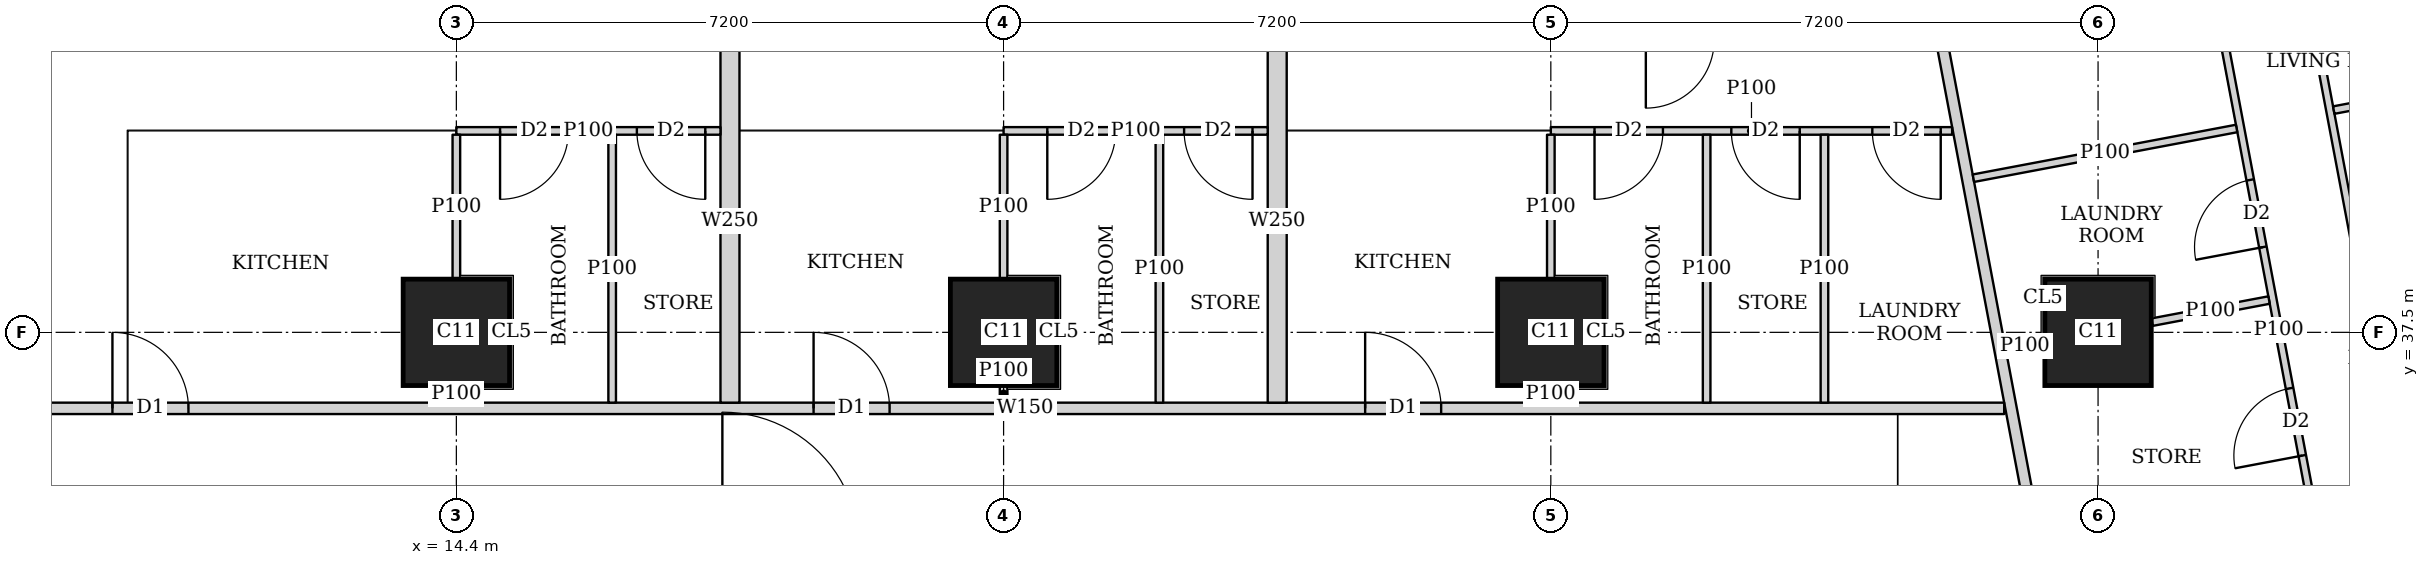
"""IFC4 building model, lengths in metres.
Left out: names, types, materials, properties, quantities, classifications, styles, units other than length and angle.
Written with IfcOpenShell. Run it as: python <this file> out.ifc"""

import sys

from ifc_helpers import new_model, si_unit, direction, frame, frame_2d, origin, origin_2d, place, context, subcontext, project, spatial, rectangle, extrude, element, fill, save


model = new_model("IFC4")
c1 = context("Model", 3, precision=1e-05, world=origin(), true_north=direction((0.0, 1.0)))
c2 = subcontext(c1, "Body", "Model", "MODEL_VIEW")
j1 = project(units=[si_unit("LENGTHUNIT", "METRE"), si_unit("PLANEANGLEUNIT", "RADIAN")], contexts=[c1])
p1 = place(None, origin())
s1 = spatial("IfcSite", under=j1, at=p1, CompositionType="ELEMENT")
p2 = place(p1, origin())
s2 = spatial("IfcBuilding", under=s1, at=p2, CompositionType="ELEMENT")
p3 = place(p2, frame((0.0, 0.0, 208.7)))
s3 = spatial("IfcBuildingStorey", under=s2, at=p3, CompositionType="ELEMENT", Elevation=208.7)
for number, where, z_axis, x_axis in (
    (1, (14.4, 37.5, 0.0), (0.0, 0.0, 1.0), (1.0, 0.0, 0.0)),
    (2, (21.6, 37.5, 0.0), (0.0, 0.0, 1.0), (1.0, 0.0, 0.0)),
    (3, (28.8, 37.5, 0.0), (0.0, 0.0, 1.0), (1.0, 0.0, 0.0)),
    (4, (36.0, 37.5, 0.0), (0.0, 0.0, 1.0), (1.0, 0.0, 0.0)),
):
    element("IfcColumn", number, at=place(p3, frame(where, z_axis=z_axis, x_axis=x_axis)), inside=s3, PredefinedType="COLUMN", context=c2, shape_type="SweptSolid", body=[
        extrude(rectangle(XDim=1.4, YDim=1.4, at=origin_2d()), origin(), (0.0, 0.0, 1.0), 3.75),
    ])
p4 = place(p3, frame((9.001, 36.5, 0.0), z_axis=(0.0, 0.0, 1.0), x_axis=(1.0, 0.0, 0.0)))
e5 = element("IfcWall", 5, at=p4, inside=s3, PredefinedType="SOLIDWALL", context=c2, shape_type="SweptSolid", body=[
    extrude(rectangle(XDim=25.764, YDim=0.15, at=frame_2d((12.882, 0.0))), origin(), (0.0, 0.0, 1.0), 3.5),
])
p5 = place(p4, frame((0.874, 0.0, 0.0)))
e6 = element("IfcOpeningElement", 6, at=p5, cuts=e5, PredefinedType="OPENING", context=c2, shape_type="SweptSolid", body=[
    extrude(rectangle(XDim=1.0, YDim=2.1, at=frame_2d((0.5, 1.05))), frame((0.0, 0.085, 0.0), z_axis=(0.0, -1.0, 0.0), x_axis=(1.0, 0.0, 0.0)), (0.0, 0.0, 1.0), 0.17),
])
p6 = place(p4, frame((10.099, 0.0, 0.0)))
e7 = element("IfcOpeningElement", 7, at=p6, cuts=e5, PredefinedType="OPENING", context=c2, shape_type="SweptSolid", body=[
    extrude(rectangle(XDim=1.0, YDim=2.1, at=frame_2d((0.5, 1.05))), frame((0.0, 0.085, 0.0), z_axis=(0.0, -1.0, 0.0), x_axis=(1.0, 0.0, 0.0)), (0.0, 0.0, 1.0), 0.17),
])
p7 = place(p4, frame((17.356, 0.0, 0.0)))
e8 = element("IfcOpeningElement", 8, at=p7, cuts=e5, PredefinedType="OPENING", context=c2, shape_type="SweptSolid", body=[
    extrude(rectangle(XDim=1.0, YDim=2.1, at=frame_2d((0.5, 1.05))), frame((0.0, 0.085, 0.0), z_axis=(0.0, -1.0, 0.0), x_axis=(1.0, 0.0, 0.0)), (0.0, 0.0, 1.0), 0.17),
])
p8 = place(p3, frame((33.68, 42.723, 0.0), z_axis=(0.0, 0.0, 1.0), x_axis=(0.185601160014, -0.982625162207, 0.0)))
e9 = element("IfcWall", 9, at=p8, inside=s3, PredefinedType="SOLIDWALL", context=c2, shape_type="SweptSolid", body=[
    extrude(rectangle(XDim=41.051, YDim=0.15, at=frame_2d((20.526, 0.0))), origin(), (0.0, 0.0, 1.0), 2.5),
])
p9 = place(p8, frame((12.307, 0.0, 0.0)))
e10 = element("IfcOpeningElement", 10, at=p9, cuts=e9, PredefinedType="OPENING", context=c2, shape_type="SweptSolid", body=[
    extrude(rectangle(XDim=1.0, YDim=2.1, at=frame_2d((0.5, 1.05))), frame((0.0, 0.085, 0.0), z_axis=(0.0, -1.0, 0.0), x_axis=(1.0, 0.0, 0.0)), (0.0, 0.0, 1.0), 0.17),
])
p10 = place(p8, frame((16.123, 0.0, 0.0)))
e11 = element("IfcOpeningElement", 11, at=p10, cuts=e9, PredefinedType="OPENING", context=c2, shape_type="SweptSolid", body=[
    extrude(rectangle(XDim=1.0, YDim=2.1, at=frame_2d((0.5, 1.05))), frame((0.0, 0.085, 0.0), z_axis=(0.0, -1.0, 0.0), x_axis=(1.0, 0.0, 0.0)), (0.0, 0.0, 1.0), 0.17),
])
p11 = place(p8, frame((30.902, 0.0, 0.0)))
e12 = element("IfcOpeningElement", 12, at=p11, cuts=e9, PredefinedType="OPENING", context=c2, shape_type="SweptSolid", body=[
    extrude(rectangle(XDim=1.0, YDim=2.1, at=frame_2d((0.5, 1.05))), frame((0.0, 0.085, 0.0), z_axis=(0.0, -1.0, 0.0), x_axis=(1.0, 0.0, 0.0)), (0.0, 0.0, 1.0), 0.17),
])
p12 = place(p3, frame((38.764, 41.941, 0.0), z_axis=(0.0, 0.0, 1.0), x_axis=(0.185548572312, -0.982635093671, 0.0)))
e13 = element("IfcWall", 13, at=p12, inside=s3, PredefinedType="PARTITIONING", context=c2, shape_type="SweptSolid", body=[
    extrude(rectangle(XDim=9.135, YDim=0.1, at=frame_2d((4.568, 0.0))), origin(), (0.0, 0.0, 1.0), 3.5),
])
p13 = place(p12, frame((8.085, 0.0, 0.0)))
e14 = element("IfcOpeningElement", 14, at=p13, cuts=e13, PredefinedType="OPENING", context=c2, shape_type="SweptSolid", body=[
    extrude(rectangle(XDim=0.9, YDim=2.1, at=frame_2d((0.45, 1.05))), frame((0.0, 0.06, 0.0), z_axis=(0.0, -1.0, 0.0), x_axis=(1.0, 0.0, 0.0)), (0.0, 0.0, 1.0), 0.12),
])
p14 = place(p12, frame((3.7, 0.0, 0.0)))
e15 = element("IfcOpeningElement", 15, at=p14, cuts=e13, PredefinedType="OPENING", context=c2, shape_type="SweptSolid", body=[
    extrude(rectangle(XDim=0.9, YDim=2.1, at=frame_2d((0.45, 1.05))), frame((0.0, 0.06, 0.0), z_axis=(0.0, -1.0, 0.0), x_axis=(1.0, 0.0, 0.0)), (0.0, 0.0, 1.0), 0.12),
])
p15 = place(p3, frame((37.473, 42.309, 0.0), z_axis=(0.0, 0.0, 1.0), x_axis=(0.185491912953, -0.982645790827, 0.0)))
e16 = element("IfcWall", 16, at=p15, inside=s3, PredefinedType="PARTITIONING", context=c2, shape_type="SweptSolid", body=[
    extrude(rectangle(XDim=9.737, YDim=0.1, at=frame_2d((4.869, 0.0))), origin(), (0.0, 0.0, 1.0), 3.5),
])
p16 = place(p15, frame((8.312, 0.0, 0.0)))
e17 = element("IfcOpeningElement", 17, at=p16, cuts=e16, PredefinedType="OPENING", context=c2, shape_type="SweptSolid", body=[
    extrude(rectangle(XDim=0.9, YDim=2.1, at=frame_2d((0.45, 1.05))), frame((0.0, 0.06, 0.0), z_axis=(0.0, -1.0, 0.0), x_axis=(1.0, 0.0, 0.0)), (0.0, 0.0, 1.0), 0.12),
])
p17 = place(p15, frame((2.853, 0.0, 0.0)))
e18 = element("IfcOpeningElement", 18, at=p17, cuts=e16, PredefinedType="OPENING", context=c2, shape_type="SweptSolid", body=[
    extrude(rectangle(XDim=0.9, YDim=2.1, at=frame_2d((0.45, 1.05))), frame((0.0, 0.06, 0.0), z_axis=(0.0, -1.0, 0.0), x_axis=(1.0, 0.0, 0.0)), (0.0, 0.0, 1.0), 0.12),
])
p18 = place(p15, frame((5.644, 0.0, 0.0)))
e19 = element("IfcOpeningElement", 19, at=p18, cuts=e16, PredefinedType="OPENING", context=c2, shape_type="SweptSolid", body=[
    extrude(rectangle(XDim=0.9, YDim=2.1, at=frame_2d((0.45, 1.05))), frame((0.0, 0.06, 0.0), z_axis=(0.0, -1.0, 0.0), x_axis=(1.0, 0.0, 0.0)), (0.0, 0.0, 1.0), 0.12),
])
p19 = place(p3, frame((43.277, 41.212, 0.0), z_axis=(0.0, 0.0, 1.0), x_axis=(-0.982665405803, -0.185387972203, 0.0)))
e20 = element("IfcWall", 20, at=p19, inside=s3, PredefinedType="PARTITIONING", context=c2, shape_type="SweptSolid", body=[
    extrude(rectangle(XDim=4.25, YDim=0.1, at=frame_2d((2.125, 0.0))), origin(), (0.0, 0.0, 1.0), 2.05),
])
p20 = place(p3, frame((37.823, 40.182, 0.0), z_axis=(0.0, 0.0, 1.0), x_axis=(-0.98263926043, -0.185526504472, 0.0)))
e21 = element("IfcWall", 21, at=p20, inside=s3, PredefinedType="PARTITIONING", context=c2, shape_type="SweptSolid", body=[
    extrude(rectangle(XDim=3.524, YDim=0.1, at=frame_2d((1.762, 0.0))), origin(), (0.0, 0.0, 1.0), 3.5),
])
p21 = place(p3, frame((38.25, 37.925, 0.0), z_axis=(0.0, 0.0, 1.0), x_axis=(-0.982610209589, -0.185680305934, 0.0)))
e22 = element("IfcWall", 22, at=p21, inside=s3, PredefinedType="PARTITIONING", context=c2, shape_type="SweptSolid", body=[
    extrude(rectangle(XDim=1.567, YDim=0.1, at=frame_2d((0.784, 0.0))), origin(), (0.0, 0.0, 1.0), 3.5),
])
p22 = place(p3, frame((35.29, 37.366, 0.0), z_axis=(0.0, 0.0, 1.0), x_axis=(-0.982715597703, -0.185121727606, 0.0)))
e23 = element("IfcWall", 23, at=p22, inside=s3, PredefinedType="PARTITIONING", context=c2, shape_type="SweptSolid", body=[
    extrude(rectangle(XDim=0.513, YDim=0.1, at=frame_2d((0.256, 0.0))), origin(), (0.0, 0.0, 1.0), 3.5),
])
p23 = place(p3, frame((14.4, 40.15, 0.0), z_axis=(0.0, 0.0, 1.0), x_axis=(1.0, 0.0, 0.0)))
e24 = element("IfcWall", 24, at=p23, inside=s3, PredefinedType="PARTITIONING", context=c2, shape_type="SweptSolid", body=[
    extrude(rectangle(XDim=3.475, YDim=0.1, at=frame_2d((1.738, 0.0))), origin(), (0.0, 0.0, 1.0), 3.5),
])
p24 = place(p23, frame((0.575, 0.0, 0.0)))
e25 = element("IfcOpeningElement", 25, at=p24, cuts=e24, PredefinedType="OPENING", context=c2, shape_type="SweptSolid", body=[
    extrude(rectangle(XDim=0.9, YDim=2.1, at=frame_2d((0.45, 1.05))), frame((0.0, 0.06, 0.0), z_axis=(0.0, -1.0, 0.0), x_axis=(1.0, 0.0, 0.0)), (0.0, 0.0, 1.0), 0.12),
])
p25 = place(p23, frame((2.375, 0.0, 0.0)))
e26 = element("IfcOpeningElement", 26, at=p25, cuts=e24, PredefinedType="OPENING", context=c2, shape_type="SweptSolid", body=[
    extrude(rectangle(XDim=0.9, YDim=2.1, at=frame_2d((0.45, 1.05))), frame((0.0, 0.06, 0.0), z_axis=(0.0, -1.0, 0.0), x_axis=(1.0, 0.0, 0.0)), (0.0, 0.0, 1.0), 0.12),
])
p26 = place(p3, frame((14.4, 36.575, 0.0), z_axis=(0.0, 0.0, 1.0), x_axis=(0.0, 1.0, 0.0)))
e27 = element("IfcWall", 27, at=p26, inside=s3, PredefinedType="PARTITIONING", context=c2, shape_type="SweptSolid", body=[
    extrude(rectangle(XDim=0.224, YDim=0.1, at=frame_2d((0.112, 0.0))), origin(), (0.0, 0.0, 1.0), 3.5),
])
p27 = place(p3, frame((14.4, 38.201, 0.0), z_axis=(0.0, 0.0, 1.0), x_axis=(0.0, 1.0, 0.0)))
e28 = element("IfcWall", 28, at=p27, inside=s3, PredefinedType="PARTITIONING", context=c2, shape_type="SweptSolid", body=[
    extrude(rectangle(XDim=1.899, YDim=0.1, at=frame_2d((0.95, 0.0))), origin(), (0.0, 0.0, 1.0), 3.5),
])
p28 = place(p3, frame((16.45, 36.575, 0.0), z_axis=(0.0, 0.0, 1.0), x_axis=(0.0, 1.0, 0.0)))
e29 = element("IfcWall", 29, at=p28, inside=s3, PredefinedType="PARTITIONING", context=c2, shape_type="SweptSolid", body=[
    extrude(rectangle(XDim=3.525, YDim=0.1, at=frame_2d((1.763, 0.0))), origin(), (0.0, 0.0, 1.0), 3.5),
])
p29 = place(p3, frame((21.6, 40.15, 0.0), z_axis=(0.0, 0.0, 1.0), x_axis=(1.0, 0.0, 0.0)))
e30 = element("IfcWall", 30, at=p29, inside=s3, PredefinedType="PARTITIONING", context=c2, shape_type="SweptSolid", body=[
    extrude(rectangle(XDim=3.475, YDim=0.1, at=frame_2d((1.737, 0.0))), origin(), (0.0, 0.0, 1.0), 3.5),
])
p30 = place(p29, frame((0.575, 0.0, 0.0)))
e31 = element("IfcOpeningElement", 31, at=p30, cuts=e30, PredefinedType="OPENING", context=c2, shape_type="SweptSolid", body=[
    extrude(rectangle(XDim=0.9, YDim=2.1, at=frame_2d((0.45, 1.05))), frame((0.0, 0.06, 0.0), z_axis=(0.0, -1.0, 0.0), x_axis=(1.0, 0.0, 0.0)), (0.0, 0.0, 1.0), 0.12),
])
p31 = place(p29, frame((2.375, 0.0, 0.0)))
e32 = element("IfcOpeningElement", 32, at=p31, cuts=e30, PredefinedType="OPENING", context=c2, shape_type="SweptSolid", body=[
    extrude(rectangle(XDim=0.9, YDim=2.1, at=frame_2d((0.45, 1.05))), frame((0.0, 0.06, 0.0), z_axis=(0.0, -1.0, 0.0), x_axis=(1.0, 0.0, 0.0)), (0.0, 0.0, 1.0), 0.12),
])
p32 = place(p3, frame((21.6, 36.575, 0.0), z_axis=(0.0, 0.0, 1.0), x_axis=(0.0, 1.0, 0.0)))
e33 = element("IfcWall", 33, at=p32, inside=s3, PredefinedType="PARTITIONING", context=c2, shape_type="SweptSolid", body=[
    extrude(rectangle(XDim=0.224, YDim=0.1, at=frame_2d((0.112, 0.0))), origin(), (0.0, 0.0, 1.0), 3.5),
])
p33 = place(p3, frame((21.6, 38.201, 0.0), z_axis=(0.0, 0.0, 1.0), x_axis=(0.0, 1.0, 0.0)))
e34 = element("IfcWall", 34, at=p33, inside=s3, PredefinedType="PARTITIONING", context=c2, shape_type="SweptSolid", body=[
    extrude(rectangle(XDim=1.899, YDim=0.1, at=frame_2d((0.95, 0.0))), origin(), (0.0, 0.0, 1.0), 3.5),
])
p34 = place(p3, frame((23.65, 36.575, 0.0), z_axis=(0.0, 0.0, 1.0), x_axis=(0.0, 1.0, 0.0)))
e35 = element("IfcWall", 35, at=p34, inside=s3, PredefinedType="PARTITIONING", context=c2, shape_type="SweptSolid", body=[
    extrude(rectangle(XDim=3.525, YDim=0.1, at=frame_2d((1.763, 0.0))), origin(), (0.0, 0.0, 1.0), 3.5),
])
p35 = place(p3, frame((18.0, 36.575, 0.0), z_axis=(0.0, 0.0, 1.0), x_axis=(0.0, 1.0, 0.0)))
e36 = element("IfcWall", 36, at=p35, inside=s3, PredefinedType="SOLIDWALL", context=c2, shape_type="SweptSolid", body=[
    extrude(rectangle(XDim=4.775, YDim=0.25, at=frame_2d((2.388, 0.0))), origin(), (0.0, 0.0, 1.0), 3.5),
])
p36 = place(p3, frame((28.8, 40.15, 0.0), z_axis=(0.0, 0.0, 1.0), x_axis=(1.0, 0.0, 0.0)))
e37 = element("IfcWall", 37, at=p36, inside=s3, PredefinedType="PARTITIONING", context=c2, shape_type="SweptSolid", body=[
    extrude(rectangle(XDim=5.28, YDim=0.1, at=frame_2d((2.64, 0.0))), origin(), (0.0, 0.0, 1.0), 3.5),
])
p37 = place(p36, frame((0.575, 0.0, 0.0)))
e38 = element("IfcOpeningElement", 38, at=p37, cuts=e37, PredefinedType="OPENING", context=c2, shape_type="SweptSolid", body=[
    extrude(rectangle(XDim=0.9, YDim=2.1, at=frame_2d((0.45, 1.05))), frame((0.0, 0.06, 0.0), z_axis=(0.0, -1.0, 0.0), x_axis=(1.0, 0.0, 0.0)), (0.0, 0.0, 1.0), 0.12),
])
p38 = place(p36, frame((4.23, 0.0, 0.0)))
e39 = element("IfcOpeningElement", 39, at=p38, cuts=e37, PredefinedType="OPENING", context=c2, shape_type="SweptSolid", body=[
    extrude(rectangle(XDim=0.9, YDim=2.1, at=frame_2d((0.45, 1.05))), frame((0.0, 0.06, 0.0), z_axis=(0.0, -1.0, 0.0), x_axis=(1.0, 0.0, 0.0)), (0.0, 0.0, 1.0), 0.12),
])
p39 = place(p36, frame((2.375, 0.0, 0.0)))
e40 = element("IfcOpeningElement", 40, at=p39, cuts=e37, PredefinedType="OPENING", context=c2, shape_type="SweptSolid", body=[
    extrude(rectangle(XDim=0.9, YDim=2.1, at=frame_2d((0.45, 1.05))), frame((0.0, 0.06, 0.0), z_axis=(0.0, -1.0, 0.0), x_axis=(1.0, 0.0, 0.0)), (0.0, 0.0, 1.0), 0.12),
])
p40 = place(p3, frame((28.8, 36.575, 0.0), z_axis=(0.0, 0.0, 1.0), x_axis=(0.0, 1.0, 0.0)))
e41 = element("IfcWall", 41, at=p40, inside=s3, PredefinedType="PARTITIONING", context=c2, shape_type="SweptSolid", body=[
    extrude(rectangle(XDim=0.224, YDim=0.1, at=frame_2d((0.112, 0.0))), origin(), (0.0, 0.0, 1.0), 3.5),
])
p41 = place(p3, frame((28.8, 38.201, 0.0), z_axis=(0.0, 0.0, 1.0), x_axis=(0.0, 1.0, 0.0)))
e42 = element("IfcWall", 42, at=p41, inside=s3, PredefinedType="PARTITIONING", context=c2, shape_type="SweptSolid", body=[
    extrude(rectangle(XDim=1.899, YDim=0.1, at=frame_2d((0.95, 0.0))), origin(), (0.0, 0.0, 1.0), 3.5),
])
for number, where, z_axis, x_axis in (
    (43, (32.4, 36.575, 0.0), (0.0, 0.0, 1.0), (0.0, 1.0, 0.0)),
    (44, (30.85, 36.575, 0.0), (0.0, 0.0, 1.0), (0.0, 1.0, 0.0)),
):
    element("IfcWall", number, at=place(p3, frame(where, z_axis=z_axis, x_axis=x_axis)), inside=s3, PredefinedType="PARTITIONING", context=c2, shape_type="SweptSolid", body=[
        extrude(rectangle(XDim=3.525, YDim=0.1, at=frame_2d((1.763, 0.0))), origin(), (0.0, 0.0, 1.0), 3.5),
    ])
p42 = place(p3, frame((25.2, 36.575, 0.0), z_axis=(0.0, 0.0, 1.0), x_axis=(0.0, 1.0, 0.0)))
e45 = element("IfcWall", 45, at=p42, inside=s3, PredefinedType="SOLIDWALL", context=c2, shape_type="SweptSolid", body=[
    extrude(rectangle(XDim=4.775, YDim=0.25, at=frame_2d((2.388, 0.0))), origin(), (0.0, 0.0, 1.0), 3.5),
])
p43 = place(p17, origin())
e46 = element("IfcDoor", 46, at=p43, inside=s3, OperationType="SINGLE_SWING_LEFT", PredefinedType="DOOR", context=c2, shape_type="SweptSolid", body=[
    extrude(rectangle(XDim=0.9, YDim=2.1, at=frame_2d((0.45, 1.05))), frame((0.0, 0.025, 0.0), z_axis=(0.0, -1.0, 0.0), x_axis=(1.0, 0.0, 0.0)), (0.0, 0.0, 1.0), 0.05),
])
fill(e18, e46)
p44 = place(p18, origin())
e47 = element("IfcDoor", 47, at=p44, inside=s3, OperationType="SINGLE_SWING_LEFT", PredefinedType="DOOR", context=c2, shape_type="SweptSolid", body=[
    extrude(rectangle(XDim=0.9, YDim=2.1, at=frame_2d((0.45, 1.05))), frame((0.0, 0.025, 0.0), z_axis=(0.0, -1.0, 0.0), x_axis=(1.0, 0.0, 0.0)), (0.0, 0.0, 1.0), 0.05),
])
fill(e19, e47)
p45 = place(p24, origin())
e48 = element("IfcDoor", 48, at=p45, inside=s3, OperationType="SINGLE_SWING_RIGHT", PredefinedType="DOOR", context=c2, shape_type="SweptSolid", body=[
    extrude(rectangle(XDim=0.9, YDim=2.1, at=frame_2d((0.45, 1.05))), frame((0.0, 0.025, 0.0), z_axis=(0.0, -1.0, 0.0), x_axis=(1.0, 0.0, 0.0)), (0.0, 0.0, 1.0), 0.05),
])
fill(e25, e48)
p46 = place(p25, origin())
e49 = element("IfcDoor", 49, at=p46, inside=s3, OperationType="SINGLE_SWING_LEFT", PredefinedType="DOOR", context=c2, shape_type="SweptSolid", body=[
    extrude(rectangle(XDim=0.9, YDim=2.1, at=frame_2d((0.45, 1.05))), frame((0.0, 0.025, 0.0), z_axis=(0.0, -1.0, 0.0), x_axis=(1.0, 0.0, 0.0)), (0.0, 0.0, 1.0), 0.05),
])
fill(e26, e49)
p47 = place(p5, origin())
e50 = element("IfcDoor", 50, at=p47, inside=s3, OperationType="SINGLE_SWING_LEFT", PredefinedType="DOOR", context=c2, shape_type="SweptSolid", body=[
    extrude(rectangle(XDim=1.0, YDim=2.1, at=frame_2d((0.5, 1.05))), frame((0.0, 0.025, 0.0), z_axis=(0.0, -1.0, 0.0), x_axis=(1.0, 0.0, 0.0)), (0.0, 0.0, 1.0), 0.05),
])
fill(e6, e50)
p48 = place(p30, origin())
e51 = element("IfcDoor", 51, at=p48, inside=s3, OperationType="SINGLE_SWING_RIGHT", PredefinedType="DOOR", context=c2, shape_type="SweptSolid", body=[
    extrude(rectangle(XDim=0.9, YDim=2.1, at=frame_2d((0.45, 1.05))), frame((0.0, 0.025, 0.0), z_axis=(0.0, -1.0, 0.0), x_axis=(1.0, 0.0, 0.0)), (0.0, 0.0, 1.0), 0.05),
])
fill(e31, e51)
p49 = place(p31, origin())
e52 = element("IfcDoor", 52, at=p49, inside=s3, OperationType="SINGLE_SWING_LEFT", PredefinedType="DOOR", context=c2, shape_type="SweptSolid", body=[
    extrude(rectangle(XDim=0.9, YDim=2.1, at=frame_2d((0.45, 1.05))), frame((0.0, 0.025, 0.0), z_axis=(0.0, -1.0, 0.0), x_axis=(1.0, 0.0, 0.0)), (0.0, 0.0, 1.0), 0.05),
])
fill(e32, e52)
p50 = place(p6, origin())
e53 = element("IfcDoor", 53, at=p50, inside=s3, OperationType="SINGLE_SWING_LEFT", PredefinedType="DOOR", context=c2, shape_type="SweptSolid", body=[
    extrude(rectangle(XDim=1.0, YDim=2.1, at=frame_2d((0.5, 1.05))), frame((0.0, 0.025, 0.0), z_axis=(0.0, -1.0, 0.0), x_axis=(1.0, 0.0, 0.0)), (0.0, 0.0, 1.0), 0.05),
])
fill(e7, e53)
p51 = place(p37, origin())
e54 = element("IfcDoor", 54, at=p51, inside=s3, OperationType="SINGLE_SWING_RIGHT", PredefinedType="DOOR", context=c2, shape_type="SweptSolid", body=[
    extrude(rectangle(XDim=0.9, YDim=2.1, at=frame_2d((0.45, 1.05))), frame((0.0, 0.025, 0.0), z_axis=(0.0, -1.0, 0.0), x_axis=(1.0, 0.0, 0.0)), (0.0, 0.0, 1.0), 0.05),
])
fill(e38, e54)
p52 = place(p38, origin())
e55 = element("IfcDoor", 55, at=p52, inside=s3, OperationType="SINGLE_SWING_LEFT", PredefinedType="DOOR", context=c2, shape_type="SweptSolid", body=[
    extrude(rectangle(XDim=0.9, YDim=2.1, at=frame_2d((0.45, 1.05))), frame((0.0, 0.025, 0.0), z_axis=(0.0, -1.0, 0.0), x_axis=(1.0, 0.0, 0.0)), (0.0, 0.0, 1.0), 0.05),
])
fill(e39, e55)
p53 = place(p39, origin())
e56 = element("IfcDoor", 56, at=p53, inside=s3, OperationType="SINGLE_SWING_LEFT", PredefinedType="DOOR", context=c2, shape_type="SweptSolid", body=[
    extrude(rectangle(XDim=0.9, YDim=2.1, at=frame_2d((0.45, 1.05))), frame((0.0, 0.025, 0.0), z_axis=(0.0, -1.0, 0.0), x_axis=(1.0, 0.0, 0.0)), (0.0, 0.0, 1.0), 0.05),
])
fill(e40, e56)
p54 = place(p7, origin())
e57 = element("IfcDoor", 57, at=p54, inside=s3, OperationType="SINGLE_SWING_LEFT", PredefinedType="DOOR", context=c2, shape_type="SweptSolid", body=[
    extrude(rectangle(XDim=1.0, YDim=2.1, at=frame_2d((0.5, 1.05))), frame((0.0, 0.025, 0.0), z_axis=(0.0, -1.0, 0.0), x_axis=(1.0, 0.0, 0.0)), (0.0, 0.0, 1.0), 0.05),
])
fill(e8, e57)
save(model, sys.argv[1])
